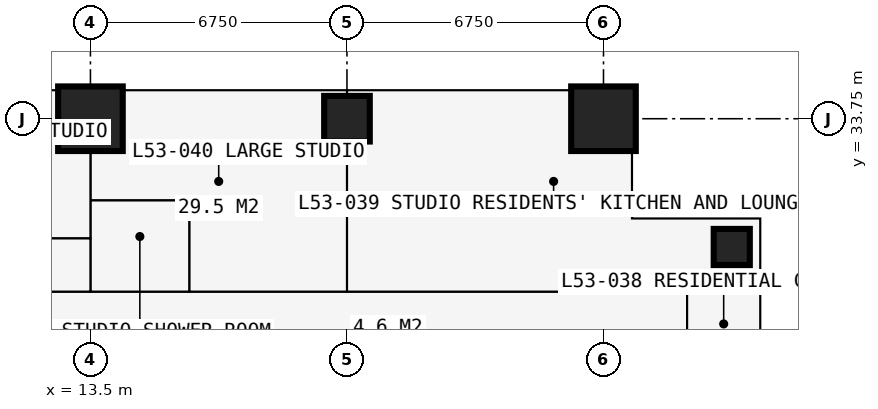
"""IFC4 building model, lengths in metres.
Left out: names, types, materials, properties, quantities, classifications, styles, units other than length and angle.
Written with IfcOpenShell. Run it as: python <this file> out.ifc"""

import sys

from ifc_helpers import new_model, si_unit, direction, frame, frame_2d, origin, origin_2d, place, context, subcontext, project, spatial, rectangle, extrude, element, fill, save


model = new_model("IFC4")
c1 = context("Model", 3, precision=1e-05, world=origin(), true_north=direction((0.0, 1.0)))
c2 = subcontext(c1, "Body", "Model", "MODEL_VIEW")
j1 = project(units=[si_unit("LENGTHUNIT", "METRE"), si_unit("PLANEANGLEUNIT", "RADIAN")], contexts=[c1])
p1 = place(None, origin())
s1 = spatial("IfcSite", under=j1, at=p1, CompositionType="ELEMENT")
p2 = place(p1, origin())
s2 = spatial("IfcBuilding", under=s1, at=p2, CompositionType="ELEMENT")
p3 = place(p2, frame((0.0, 0.0, 196.2)))
s3 = spatial("IfcBuildingStorey", under=s2, at=p3, CompositionType="ELEMENT", Elevation=196.2)
p4 = place(p3, frame((13.5, 33.75, 0.0), z_axis=(0.0, 0.0, 1.0), x_axis=(1.0, 0.0, 0.0)))
e1 = element("IfcColumn", 1, at=p4, inside=s3, PredefinedType="COLUMN", context=c2, shape_type="SweptSolid", body=[
    extrude(rectangle(XDim=1.7, YDim=1.7, at=origin_2d()), origin(), (0.0, 0.0, 1.0), 3.6),
])
p5 = place(p3, frame((20.25, 33.75, 0.0), z_axis=(0.0, 0.0, 1.0), x_axis=(1.0, 0.0, 0.0)))
e2 = element("IfcColumn", 2, at=p5, inside=s3, PredefinedType="COLUMN", context=c2, shape_type="SweptSolid", body=[
    extrude(rectangle(XDim=1.2, YDim=1.2, at=origin_2d()), origin(), (0.0, 0.0, 1.0), 3.6),
])
p6 = place(p3, frame((27.0, 33.75, 0.0), z_axis=(0.0, 0.0, 1.0), x_axis=(1.0, 0.0, 0.0)))
e3 = element("IfcColumn", 3, at=p6, inside=s3, PredefinedType="COLUMN", context=c2, shape_type="SweptSolid", body=[
    extrude(rectangle(XDim=1.7, YDim=1.7, at=origin_2d()), origin(), (0.0, 0.0, 1.0), 3.6),
])
p7 = place(p3, frame((30.375, 30.375, 0.0), z_axis=(0.0, 0.0, 1.0), x_axis=(1.0, 0.0, 0.0)))
e4 = element("IfcColumn", 4, at=p7, inside=s3, PredefinedType="COLUMN", context=c2, shape_type="SweptSolid", body=[
    extrude(rectangle(XDim=0.95, YDim=0.95, at=origin_2d()), origin(), (0.0, 0.0, 1.0), 3.6),
])
p8 = place(p3, frame((31.125, 27.75, 0.0), z_axis=(0.0, 0.0, 1.0), x_axis=(0.0, 1.0, 0.0)))
e5 = element("IfcWall", 5, at=p8, inside=s3, PredefinedType="SOLIDWALL", context=c2, shape_type="SweptSolid", body=[
    extrude(rectangle(XDim=3.375, YDim=0.3, at=frame_2d((1.688, 0.0))), origin(), (0.0, 0.0, 1.0), 3.3),
])
p9 = place(p8, frame((1.663, 0.0, 0.9)))
e6 = element("IfcOpeningElement", 6, at=p9, cuts=e5, PredefinedType="OPENING", context=c2, shape_type="SweptSolid", body=[
    extrude(rectangle(XDim=1.5, YDim=1.8, at=frame_2d((0.75, 0.9))), frame((0.0, 0.16, 0.0), z_axis=(0.0, -1.0, 0.0), x_axis=(1.0, 0.0, 0.0)), (0.0, 0.0, 1.0), 0.32),
])
p10 = place(p3, frame((31.125, 31.125, 0.0), z_axis=(0.0, 0.0, 1.0), x_axis=(-1.0, 0.0, 0.0)))
e7 = element("IfcWall", 7, at=p10, inside=s3, PredefinedType="SOLIDWALL", context=c2, shape_type="SweptSolid", body=[
    extrude(rectangle(XDim=3.375, YDim=0.3, at=frame_2d((1.688, 0.0))), origin(), (0.0, 0.0, 1.0), 3.3),
])
p11 = place(p10, frame((0.788, 0.0, 0.6)))
e8 = element("IfcOpeningElement", 8, at=p11, cuts=e7, PredefinedType="OPENING", context=c2, shape_type="SweptSolid", body=[
    extrude(rectangle(XDim=1.8, YDim=2.1, at=frame_2d((0.9, 1.05))), frame((0.0, 0.16, 0.0), z_axis=(0.0, -1.0, 0.0), x_axis=(1.0, 0.0, 0.0)), (0.0, 0.0, 1.0), 0.32),
])
p12 = place(p3, frame((27.75, 31.125, 0.0), z_axis=(0.0, 0.0, 1.0), x_axis=(0.0, 1.0, 0.0)))
e9 = element("IfcWall", 9, at=p12, inside=s3, PredefinedType="SOLIDWALL", context=c2, shape_type="SweptSolid", body=[
    extrude(rectangle(XDim=3.375, YDim=0.3, at=frame_2d((1.688, 0.0))), origin(), (0.0, 0.0, 1.0), 3.3),
])
p13 = place(p12, frame((0.218, 0.0, 0.9)))
e10 = element("IfcOpeningElement", 10, at=p13, cuts=e9, PredefinedType="OPENING", context=c2, shape_type="SweptSolid", body=[
    extrude(rectangle(XDim=1.5, YDim=1.8, at=frame_2d((0.75, 0.9))), frame((0.0, 0.16, 0.0), z_axis=(0.0, -1.0, 0.0), x_axis=(1.0, 0.0, 0.0)), (0.0, 0.0, 1.0), 0.32),
])
p14 = place(p3, frame((10.125, 30.6, 0.0), z_axis=(0.0, 0.0, 1.0), x_axis=(1.0, 0.0, 0.0)))
e11 = element("IfcWall", 11, at=p14, inside=s3, PredefinedType="PARTITIONING", context=c2, shape_type="SweptSolid", body=[
    extrude(rectangle(XDim=3.375, YDim=0.1, at=frame_2d((1.688, 0.0))), origin(), (0.0, 0.0, 1.0), 3.3),
])
p15 = place(p14, frame((2.2, 0.0, 0.0)))
e12 = element("IfcOpeningElement", 12, at=p15, cuts=e11, PredefinedType="OPENING", context=c2, shape_type="SweptSolid", body=[
    extrude(rectangle(XDim=0.95, YDim=2.2, at=frame_2d((0.475, 1.1))), frame((0.0, 0.06, 0.0), z_axis=(0.0, -1.0, 0.0), x_axis=(1.0, 0.0, 0.0)), (0.0, 0.0, 1.0), 0.12),
])
p16 = place(p3, frame((11.3, 29.2, 0.0), z_axis=(0.0, 0.0, 1.0), x_axis=(1.0, 0.0, 0.0)))
e13 = element("IfcWall", 13, at=p16, inside=s3, PredefinedType="PARTITIONING", context=c2, shape_type="SweptSolid", body=[
    extrude(rectangle(XDim=19.809, YDim=0.15, at=frame_2d((9.904, 0.0))), origin(), (0.0, 0.0, 1.0), 3.3),
])
p17 = place(p16, frame((12.9, 0.0, 0.0)))
e14 = element("IfcOpeningElement", 14, at=p17, cuts=e13, PredefinedType="OPENING", context=c2, shape_type="SweptSolid", body=[
    extrude(rectangle(XDim=1.0, YDim=2.2, at=frame_2d((0.5, 1.1))), frame((0.0, 0.085, 0.0), z_axis=(0.0, -1.0, 0.0), x_axis=(1.0, 0.0, 0.0)), (0.0, 0.0, 1.0), 0.17),
])
p18 = place(p16, frame((6.4, 0.0, 0.0)))
e15 = element("IfcOpeningElement", 15, at=p18, cuts=e13, PredefinedType="OPENING", context=c2, shape_type="SweptSolid", body=[
    extrude(rectangle(XDim=0.95, YDim=2.2, at=frame_2d((0.475, 1.1))), frame((0.0, 0.085, 0.0), z_axis=(0.0, -1.0, 0.0), x_axis=(1.0, 0.0, 0.0)), (0.0, 0.0, 1.0), 0.17),
])
p19 = place(p16, frame((0.6, 0.0, 0.0)))
e16 = element("IfcOpeningElement", 16, at=p19, cuts=e13, PredefinedType="OPENING", context=c2, shape_type="SweptSolid", body=[
    extrude(rectangle(XDim=1.0, YDim=2.2, at=frame_2d((0.5, 1.1))), frame((0.0, 0.085, 0.0), z_axis=(0.0, -1.0, 0.0), x_axis=(1.0, 0.0, 0.0)), (0.0, 0.0, 1.0), 0.17),
])
p20 = place(p3, frame((13.5, 29.2, 0.0), z_axis=(0.0, 0.0, 1.0), x_axis=(0.0, 1.0, 0.0)))
e17 = element("IfcWall", 17, at=p20, inside=s3, PredefinedType="PARTITIONING", context=c2, shape_type="SweptSolid", body=[
    extrude(rectangle(XDim=5.284, YDim=0.175, at=frame_2d((2.642, 0.0))), origin(), (0.0, 0.0, 1.0), 2.802),
])
p21 = place(p3, frame((13.5, 31.6, 0.0), z_axis=(0.0, 0.0, 1.0), x_axis=(1.0, 0.0, 0.0)))
e18 = element("IfcWall", 18, at=p21, inside=s3, PredefinedType="PARTITIONING", context=c2, shape_type="SweptSolid", body=[
    extrude(rectangle(XDim=2.6, YDim=0.1, at=frame_2d((1.3, 0.0))), origin(), (0.0, 0.0, 1.0), 3.3),
])
p22 = place(p21, frame((0.85, 0.0, 0.0)))
e19 = element("IfcOpeningElement", 19, at=p22, cuts=e18, PredefinedType="OPENING", context=c2, shape_type="SweptSolid", body=[
    extrude(rectangle(XDim=0.9, YDim=2.2, at=frame_2d((0.45, 1.1))), frame((0.0, 0.06, 0.0), z_axis=(0.0, -1.0, 0.0), x_axis=(1.0, 0.0, 0.0)), (0.0, 0.0, 1.0), 0.12),
])
p23 = place(p3, frame((16.1, 29.2, 0.0), z_axis=(0.0, 0.0, 1.0), x_axis=(0.0, 1.0, 0.0)))
e20 = element("IfcWall", 20, at=p23, inside=s3, PredefinedType="PARTITIONING", context=c2, shape_type="SweptSolid", body=[
    extrude(rectangle(XDim=2.4, YDim=0.1, at=frame_2d((1.2, 0.0))), origin(), (0.0, 0.0, 1.0), 3.3),
])
p24 = place(p3, frame((20.25, 29.2, 0.0), z_axis=(0.0, 0.0, 1.0), x_axis=(0.0, 1.0, 0.0)))
e21 = element("IfcWall", 21, at=p24, inside=s3, PredefinedType="PARTITIONING", context=c2, shape_type="SweptSolid", body=[
    extrude(rectangle(XDim=5.284, YDim=0.15, at=frame_2d((2.642, 0.0))), origin(), (0.0, 0.0, 1.0), 2.802),
])
p25 = place(p3, frame((29.2, 13.5, 0.0), z_axis=(0.0, 0.0, 1.0), x_axis=(0.0, 1.0, 0.0)))
e22 = element("IfcWall", 22, at=p25, inside=s3, PredefinedType="PARTITIONING", context=c2, shape_type="SweptSolid", body=[
    extrude(rectangle(XDim=15.7, YDim=0.2, at=frame_2d((7.85, 0.0))), origin(), (0.0, 0.0, 1.0), 3.3),
])
p26 = place(p25, frame((8.35, 0.0, 0.0)))
e23 = element("IfcOpeningElement", 23, at=p26, cuts=e22, PredefinedType="OPENING", context=c2, shape_type="SweptSolid", body=[
    extrude(rectangle(XDim=0.95, YDim=2.2, at=frame_2d((0.475, 1.1))), frame((0.0, 0.11, 0.0), z_axis=(0.0, -1.0, 0.0), x_axis=(1.0, 0.0, 0.0)), (0.0, 0.0, 1.0), 0.22),
])
p27 = place(p25, frame((1.6, 0.0, 0.0)))
e24 = element("IfcOpeningElement", 24, at=p27, cuts=e22, PredefinedType="OPENING", context=c2, shape_type="SweptSolid", body=[
    extrude(rectangle(XDim=0.95, YDim=2.2, at=frame_2d((0.475, 1.1))), frame((0.0, 0.11, 0.0), z_axis=(0.0, -1.0, 0.0), x_axis=(1.0, 0.0, 0.0)), (0.0, 0.0, 1.0), 0.22),
])
p28 = place(p25, frame((14.1, 0.0, 0.0)))
e25 = element("IfcOpeningElement", 25, at=p28, cuts=e22, PredefinedType="OPENING", context=c2, shape_type="SweptSolid", body=[
    extrude(rectangle(XDim=1.0, YDim=2.2, at=frame_2d((0.5, 1.1))), frame((0.0, 0.11, 0.0), z_axis=(0.0, -1.0, 0.0), x_axis=(1.0, 0.0, 0.0)), (0.0, 0.0, 1.0), 0.22),
])
p29 = place(p9, origin())
e26 = element("IfcWindow", 26, at=p29, inside=s3, PartitioningType="SINGLE_PANEL", PredefinedType="WINDOW", context=c2, shape_type="SweptSolid", body=[
    extrude(rectangle(XDim=1.5, YDim=1.8, at=frame_2d((0.75, 0.9))), frame((0.0, 0.03, 0.0), z_axis=(0.0, -1.0, 0.0), x_axis=(1.0, 0.0, 0.0)), (0.0, 0.0, 1.0), 0.06),
])
fill(e6, e26)
p30 = place(p11, origin())
e27 = element("IfcWindow", 27, at=p30, inside=s3, PartitioningType="SINGLE_PANEL", PredefinedType="WINDOW", context=c2, shape_type="SweptSolid", body=[
    extrude(rectangle(XDim=1.8, YDim=2.1, at=frame_2d((0.9, 1.05))), frame((0.0, 0.03, 0.0), z_axis=(0.0, -1.0, 0.0), x_axis=(1.0, 0.0, 0.0)), (0.0, 0.0, 1.0), 0.06),
])
fill(e8, e27)
p31 = place(p13, origin())
e28 = element("IfcWindow", 28, at=p31, inside=s3, PartitioningType="SINGLE_PANEL", PredefinedType="WINDOW", context=c2, shape_type="SweptSolid", body=[
    extrude(rectangle(XDim=1.5, YDim=1.8, at=frame_2d((0.75, 0.9))), frame((0.0, 0.03, 0.0), z_axis=(0.0, -1.0, 0.0), x_axis=(1.0, 0.0, 0.0)), (0.0, 0.0, 1.0), 0.06),
])
fill(e10, e28)
p32 = place(p28, origin())
e29 = element("IfcDoor", 29, at=p32, inside=s3, OperationType="SINGLE_SWING_LEFT", PredefinedType="DOOR", context=c2, shape_type="SweptSolid", body=[
    extrude(rectangle(XDim=1.0, YDim=2.2, at=frame_2d((0.5, 1.1))), frame((0.0, 0.025, 0.0), z_axis=(0.0, -1.0, 0.0), x_axis=(1.0, 0.0, 0.0)), (0.0, 0.0, 1.0), 0.05),
])
fill(e25, e29)
p33 = place(p17, origin())
e30 = element("IfcDoor", 30, at=p33, inside=s3, OperationType="SINGLE_SWING_LEFT", PredefinedType="DOOR", context=c2, shape_type="SweptSolid", body=[
    extrude(rectangle(XDim=1.0, YDim=2.2, at=frame_2d((0.5, 1.1))), frame((0.0, 0.025, 0.0), z_axis=(0.0, -1.0, 0.0), x_axis=(1.0, 0.0, 0.0)), (0.0, 0.0, 1.0), 0.05),
])
fill(e14, e30)
p34 = place(p18, origin())
e31 = element("IfcDoor", 31, at=p34, inside=s3, OperationType="SINGLE_SWING_LEFT", PredefinedType="DOOR", context=c2, shape_type="SweptSolid", body=[
    extrude(rectangle(XDim=0.95, YDim=2.2, at=frame_2d((0.475, 1.1))), frame((0.0, 0.025, 0.0), z_axis=(0.0, -1.0, 0.0), x_axis=(1.0, 0.0, 0.0)), (0.0, 0.0, 1.0), 0.05),
])
fill(e15, e31)
p35 = place(p22, origin())
e32 = element("IfcDoor", 32, at=p35, inside=s3, OperationType="SINGLE_SWING_RIGHT", PredefinedType="DOOR", context=c2, shape_type="SweptSolid", body=[
    extrude(rectangle(XDim=0.9, YDim=2.2, at=frame_2d((0.45, 1.1))), frame((0.0, 0.025, 0.0), z_axis=(0.0, -1.0, 0.0), x_axis=(1.0, 0.0, 0.0)), (0.0, 0.0, 1.0), 0.05),
])
fill(e19, e32)
p36 = place(p15, origin())
e33 = element("IfcDoor", 33, at=p36, inside=s3, OperationType="SINGLE_SWING_LEFT", PredefinedType="DOOR", context=c2, shape_type="SweptSolid", body=[
    extrude(rectangle(XDim=0.95, YDim=2.2, at=frame_2d((0.475, 1.1))), frame((0.0, 0.025, 0.0), z_axis=(0.0, -1.0, 0.0), x_axis=(1.0, 0.0, 0.0)), (0.0, 0.0, 1.0), 0.05),
])
fill(e12, e33)
p37 = place(p19, origin())
e34 = element("IfcDoor", 34, at=p37, inside=s3, OperationType="SINGLE_SWING_LEFT", PredefinedType="DOOR", context=c2, shape_type="SweptSolid", body=[
    extrude(rectangle(XDim=1.0, YDim=2.2, at=frame_2d((0.5, 1.1))), frame((0.0, 0.025, 0.0), z_axis=(0.0, -1.0, 0.0), x_axis=(1.0, 0.0, 0.0)), (0.0, 0.0, 1.0), 0.05),
])
fill(e16, e34)
save(model, sys.argv[1])
